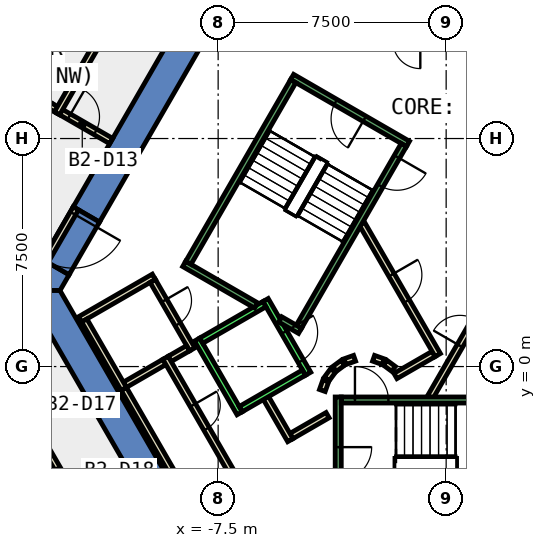
"""IFC4 building model, lengths in metres.
Left out: names, types, materials, properties, quantities, classifications, styles, units other than length and angle.
Written with IfcOpenShell. Run it as: python <this file> out.ifc"""

import sys

from ifc_helpers import new_model, si_unit, direction, frame, frame_2d, origin, place, context, subcontext, project, spatial, polyline, rectangle, outline, extrude, element, fill, save


model = new_model("IFC4")
c1 = context("Model", 3, precision=1e-05, world=origin(), true_north=direction((0.0, 1.0)))
c2 = subcontext(c1, "Body", "Model", "MODEL_VIEW")
j1 = project(units=[si_unit("LENGTHUNIT", "METRE"), si_unit("PLANEANGLEUNIT", "RADIAN")], contexts=[c1])
p1 = place(None, origin())
s1 = spatial("IfcSite", under=j1, at=p1, CompositionType="ELEMENT")
p2 = place(p1, origin())
s2 = spatial("IfcBuilding", under=s1, at=p2, CompositionType="ELEMENT")
p3 = place(p2, frame((0.0, 0.0, -11.0)))
s3 = spatial("IfcBuildingStorey", under=s2, at=p3, CompositionType="ELEMENT", Elevation=-11.0)
p4 = place(p3, frame((0.0, 0.0, -0.42)))
e1 = element("IfcWall", 1, at=p4, inside=s3, PredefinedType="SHEAR", context=c2, shape_type="SweptSolid", body=[
    extrude(outline(polyline([(-12.267, 5.252), (-11.402, 4.752), (-6.351, 13.5), (-6.928, 14.5), (-12.267, 5.252)])), origin(), (0.0, 0.0, 1.0), 5.5),
])
p5 = place(p3, frame((0.0, 0.0, -0.42)))
e2 = element("IfcWall", 2, at=p5, inside=s3, PredefinedType="SHEAR", context=c2, shape_type="SweptSolid", body=[
    extrude(outline(polyline([(-12.402, 3.02), (-13.267, 3.52), (-13.856, 2.5), (-12.702, 2.5), (-12.402, 3.02)])), origin(), (0.0, 0.0, 1.0), 5.5),
])
p6 = place(p3, frame((0.0, 0.0, 3.6)))
e3 = element("IfcWall", 3, at=p6, inside=s3, PredefinedType="SHEAR", context=c2, shape_type="SweptSolid", body=[
    extrude(outline(polyline([(-13.267, 3.52), (-12.402, 3.02), (-11.402, 4.752), (-12.267, 5.252), (-13.267, 3.52)])), origin(), (0.0, 0.0, 1.0), 1.48),
])
p7 = place(p3, frame((0.0, 0.0, -0.42)))
e4 = element("IfcWall", 4, at=p7, inside=s3, PredefinedType="SHEAR", context=c2, shape_type="SweptSolid", body=[
    extrude(outline(polyline([(-13.856, 2.5), (-6.928, -9.5), (-6.351, -8.5), (-12.702, 2.5), (-13.856, 2.5)])), origin(), (0.0, 0.0, 1.0), 5.5),
])
p8 = place(p3, frame((-12.749, 8.417, 0.0), z_axis=(0.0, 0.0, 1.0), x_axis=(0.866010750942, -0.50002537861, 0.0)))
e5 = element("IfcWall", 5, at=p8, inside=s3, PredefinedType="PARTITIONING", context=c2, shape_type="SweptSolid", body=[
    extrude(rectangle(XDim=2.0, YDim=0.2, at=frame_2d((1.0, 0.0))), origin(), (0.0, 0.0, 1.0), 5.05),
])
p9 = place(p8, frame((0.4, 0.0, 0.0)))
e6 = element("IfcOpeningElement", 6, at=p9, cuts=e5, PredefinedType="OPENING", context=c2, shape_type="SweptSolid", body=[
    extrude(rectangle(XDim=1.0, YDim=2.1, at=frame_2d((0.5, 1.05))), frame((0.0, 0.11, 0.0), z_axis=(0.0, -1.0, 0.0), x_axis=(1.0, 0.0, 0.0)), (0.0, 0.0, 1.0), 0.22),
])
p10 = place(p3, frame((-13.082, 8.609, 0.0), z_axis=(0.0, 0.0, 1.0), x_axis=(0.865998573537, -0.500046468473, 0.0)))
e7 = element("IfcWall", 7, at=p10, inside=s3, PredefinedType="PARTITIONING", context=c2, shape_type="SweptSolid", body=[
    extrude(rectangle(XDim=0.37, YDim=0.2, at=frame_2d((0.185, 0.0))), origin(), (0.0, 0.0, 1.0), 5.05),
])
p11 = place(p3, frame((-12.799, 8.33, 0.0), z_axis=(0.0, 0.0, 1.0), x_axis=(0.499923440311, 0.86606960103, 0.0)))
e8 = element("IfcWall", 8, at=p11, inside=s3, PredefinedType="PARTITIONING", context=c2, shape_type="SweptSolid", body=[
    extrude(rectangle(XDim=9.534, YDim=0.2, at=frame_2d((4.767, 0.0))), origin(), (0.0, 0.0, 1.0), 5.05),
])
p12 = place(p11, frame((5.766, 0.0, 0.0)))
e9 = element("IfcOpeningElement", 9, at=p12, cuts=e8, PredefinedType="OPENING", context=c2, shape_type="SweptSolid", body=[
    extrude(rectangle(XDim=1.0, YDim=2.1, at=frame_2d((0.5, 1.05))), frame((0.0, 0.11, 0.0), z_axis=(0.0, -1.0, 0.0), x_axis=(1.0, 0.0, 0.0)), (0.0, 0.0, 1.0), 0.22),
])
p13 = place(p3, frame((-12.124, -4.5, 0.0), z_axis=(0.0, 0.0, 1.0), x_axis=(-0.499991375441, 0.866030383119, 0.0)))
e10 = element("IfcWall", 10, at=p13, inside=s3, PredefinedType="PARTITIONING", context=c2, shape_type="SweptSolid", body=[
    extrude(rectangle(XDim=2.672, YDim=0.2, at=frame_2d((1.336, 0.0))), origin(), (0.0, 0.0, 1.0), 5.05),
])
p14 = place(p13, frame((0.743, 0.0, 0.0)))
e11 = element("IfcOpeningElement", 11, at=p14, cuts=e10, PredefinedType="OPENING", context=c2, shape_type="SweptSolid", body=[
    extrude(rectangle(XDim=1.0, YDim=2.1, at=frame_2d((0.5, 1.05))), frame((0.0, 0.11, 0.0), z_axis=(0.0, -1.0, 0.0), x_axis=(1.0, 0.0, 0.0)), (0.0, 0.0, 1.0), 0.22),
])
p15 = place(p3, frame((-9.267, 0.152, 0.0), z_axis=(0.0, 0.0, 1.0), x_axis=(-0.86599040064, -0.500060622324, 0.0)))
e12 = element("IfcWall", 12, at=p15, inside=s3, PredefinedType="PARTITIONING", context=c2, shape_type="SweptSolid", body=[
    extrude(rectangle(XDim=1.5, YDim=0.2, at=frame_2d((0.75, 0.0))), origin(), (0.0, 0.0, 1.0), 5.05),
])
p16 = place(p3, frame((-12.04, 1.553, 0.0), z_axis=(0.0, 0.0, 1.0), x_axis=(0.866056369097, 0.49994636267, 0.0)))
e13 = element("IfcWall", 13, at=p16, inside=s3, PredefinedType="PARTITIONING", context=c2, shape_type="SweptSolid", body=[
    extrude(rectangle(XDim=2.8, YDim=0.2, at=frame_2d((1.4, 0.0))), origin(), (0.0, 0.0, 1.0), 5.05),
])
p17 = place(p3, frame((-9.651, 2.817, 0.0), z_axis=(0.0, 0.0, 1.0), x_axis=(0.49989585183, -0.866085525409, 0.0)))
e14 = element("IfcWall", 14, at=p17, inside=s3, PredefinedType="PARTITIONING", context=c2, shape_type="SweptSolid", body=[
    extrude(rectangle(XDim=2.6, YDim=0.2, at=frame_2d((1.3, 0.0))), origin(), (0.0, 0.0, 1.0), 5.05),
])
p18 = place(p17, frame((0.75, 0.0, 0.0)))
e15 = element("IfcOpeningElement", 15, at=p18, cuts=e14, PredefinedType="OPENING", context=c2, shape_type="SweptSolid", body=[
    extrude(rectangle(XDim=0.9, YDim=2.1, at=frame_2d((0.45, 1.05))), frame((0.0, 0.11, 0.0), z_axis=(0.0, -1.0, 0.0), x_axis=(1.0, 0.0, 0.0)), (0.0, 0.0, 1.0), 0.22),
])
p19 = place(p3, frame((-8.488, 0.602, 0.0), z_axis=(0.0, 0.0, 1.0), x_axis=(-0.865871789474, -0.500265973451, 0.0)))
e16 = element("IfcWall", 16, at=p19, inside=s3, PredefinedType="PARTITIONING", context=c2, shape_type="SweptSolid", body=[
    extrude(rectangle(XDim=0.7, YDim=0.2, at=frame_2d((0.35, 0.0))), origin(), (0.0, 0.0, 1.0), 5.05),
])
p20 = place(p3, frame((-10.603, -0.735, 0.0), z_axis=(0.0, 0.0, 1.0), x_axis=(-0.499925626596, 0.866068339032, 0.0)))
e17 = element("IfcWall", 17, at=p20, inside=s3, PredefinedType="PARTITIONING", context=c2, shape_type="SweptSolid", body=[
    extrude(rectangle(XDim=2.601, YDim=0.2, at=frame_2d((1.3, 0.0))), origin(), (0.0, 0.0, 1.0), 5.05),
])
p21 = place(p3, frame((-9.231, 0.288, 0.0), z_axis=(0.0, 0.0, 1.0), x_axis=(0.500013631625, -0.866017533419, 0.0)))
e18 = element("IfcWall", 18, at=p21, inside=s3, PredefinedType="PARTITIONING", context=c2, shape_type="SweptSolid", body=[
    extrude(rectangle(XDim=4.5, YDim=0.2, at=frame_2d((2.25, 0.0))), origin(), (0.0, 0.0, 1.0), 5.05),
])
p22 = place(p21, frame((1.8, 0.0, 0.0)))
e19 = element("IfcOpeningElement", 19, at=p22, cuts=e18, PredefinedType="OPENING", context=c2, shape_type="SweptSolid", body=[
    extrude(rectangle(XDim=0.9, YDim=2.1, at=frame_2d((0.45, 1.05))), frame((0.0, 0.11, 0.0), z_axis=(0.0, -1.0, 0.0), x_axis=(1.0, 0.0, 0.0)), (0.0, 0.0, 1.0), 0.22),
])
p23 = place(p3, frame((-8.003, -5.238, 0.0), z_axis=(0.0, 0.0, 1.0), x_axis=(-0.500047596559, 0.865997922154, 0.0)))
e20 = element("IfcWall", 20, at=p23, inside=s3, PredefinedType="PARTITIONING", context=c2, shape_type="SweptSolid", body=[
    extrude(rectangle(XDim=5.2, YDim=0.2, at=frame_2d((2.6, 0.0))), origin(), (0.0, 0.0, 1.0), 5.05),
])
p24 = place(p3, frame((-0.52, -1.0, 0.0), z_axis=(0.0, 0.0, 1.0), x_axis=(0.50011622646, 0.865958290007, 0.0)))
e21 = element("IfcWall", 21, at=p24, inside=s3, PredefinedType="PARTITIONING", context=c2, shape_type="SweptSolid", body=[
    extrude(rectangle(XDim=4.991, YDim=0.2, at=frame_2d((2.496, 0.0))), origin(), (0.0, 0.0, 1.0), 5.05),
])
p25 = place(p24, frame((1.945, 0.0, 0.0)))
e22 = element("IfcOpeningElement", 22, at=p25, cuts=e21, PredefinedType="OPENING", context=c2, shape_type="SweptSolid", body=[
    extrude(rectangle(XDim=1.0, YDim=2.1, at=frame_2d((0.5, 1.05))), frame((0.0, 0.11, 0.0), z_axis=(0.0, -1.0, 0.0), x_axis=(1.0, 0.0, 0.0)), (0.0, 0.0, 1.0), 0.22),
])
p26 = place(p3, frame((-0.412, 0.414, 0.0), z_axis=(0.0, 0.0, 1.0), x_axis=(-0.866017369001, -0.500013916395, 0.0)))
e23 = element("IfcWall", 23, at=p26, inside=s3, PredefinedType="PARTITIONING", context=c2, shape_type="SweptSolid", body=[
    extrude(rectangle(XDim=1.45, YDim=0.2, at=frame_2d((0.725, 0.0))), origin(), (0.0, 0.0, 1.0), 5.05),
])
p27 = place(p3, frame((-1.731, -0.077, 0.0), z_axis=(0.0, 0.0, 1.0), x_axis=(-0.804311165252, 0.594208338422, 0.0)))
e24 = element("IfcWall", 24, at=p27, inside=s3, PredefinedType="PARTITIONING", context=c2, shape_type="SweptSolid", body=[
    extrude(rectangle(XDim=0.338, YDim=0.2, at=frame_2d((0.169, 0.0))), origin(), (0.0, 0.0, 1.0), 5.05),
])
p28 = place(p3, frame((-2.07, 0.16, 0.0), z_axis=(0.0, 0.0, 1.0), x_axis=(-0.942199461132, 0.335052496547, 0.0)))
e25 = element("IfcWall", 25, at=p28, inside=s3, PredefinedType="PARTITIONING", context=c2, shape_type="SweptSolid", body=[
    extrude(rectangle(XDim=0.337, YDim=0.2, at=frame_2d((0.169, 0.0))), origin(), (0.0, 0.0, 1.0), 5.05),
])
p29 = place(p3, frame((-3.012, 0.273, 0.0), z_axis=(0.0, 0.0, 1.0), x_axis=(-0.942280615813, -0.334824194261, 0.0)))
e26 = element("IfcWall", 26, at=p29, inside=s3, PredefinedType="PARTITIONING", context=c2, shape_type="SweptSolid", body=[
    extrude(rectangle(XDim=0.338, YDim=0.2, at=frame_2d((0.169, 0.0))), origin(), (0.0, 0.0, 1.0), 5.05),
])
p30 = place(p3, frame((-3.397, 0.124, 0.0), z_axis=(0.0, 0.0, 1.0), x_axis=(-0.804311165252, -0.594208338422, 0.0)))
e27 = element("IfcWall", 27, at=p30, inside=s3, PredefinedType="PARTITIONING", context=c2, shape_type="SweptSolid", body=[
    extrude(rectangle(XDim=0.338, YDim=0.2, at=frame_2d((0.169, 0.0))), origin(), (0.0, 0.0, 1.0), 5.05),
])
p31 = place(p3, frame((-3.723, -0.131, 0.0), z_axis=(0.0, 0.0, 1.0), x_axis=(-0.594675113454, -0.803966112121, 0.0)))
e28 = element("IfcWall", 28, at=p31, inside=s3, PredefinedType="PARTITIONING", context=c2, shape_type="SweptSolid", body=[
    extrude(rectangle(XDim=0.338, YDim=0.2, at=frame_2d((0.169, 0.0))), origin(), (0.0, 0.0, 1.0), 5.05),
])
p32 = place(p3, frame((-3.96, -0.47, 0.0), z_axis=(0.0, 0.0, 1.0), x_axis=(-0.334824194261, -0.942280615813, 0.0)))
e29 = element("IfcWall", 29, at=p32, inside=s3, PredefinedType="PARTITIONING", context=c2, shape_type="SweptSolid", body=[
    extrude(rectangle(XDim=0.338, YDim=0.2, at=frame_2d((0.169, 0.0))), origin(), (0.0, 0.0, 1.0), 5.05),
])
p33 = place(p3, frame((-3.9, -1.599, 0.0), z_axis=(0.0, 0.0, 1.0), x_axis=(-0.865969445389, -0.500096910261, 0.0)))
e30 = element("IfcWall", 30, at=p33, inside=s3, PredefinedType="PARTITIONING", context=c2, shape_type="SweptSolid", body=[
    extrude(rectangle(XDim=1.373, YDim=0.2, at=frame_2d((0.687, 0.0))), origin(), (0.0, 0.0, 1.0), 5.05),
])
p34 = place(p3, frame((-5.126, -2.422, 0.0), z_axis=(0.0, 0.0, 1.0), x_axis=(-0.500062241894, 0.865989465428, 0.0)))
e31 = element("IfcWall", 31, at=p34, inside=s3, PredefinedType="PARTITIONING", context=c2, shape_type="SweptSolid", body=[
    extrude(rectangle(XDim=1.7, YDim=0.2, at=frame_2d((0.85, 0.0))), origin(), (0.0, 0.0, 1.0), 5.05),
])
p35 = place(p3, frame((-2.771, 4.7, 0.0), z_axis=(0.0, 0.0, 1.0), x_axis=(0.499969479948, -0.866043023828, 0.0)))
e32 = element("IfcWall", 32, at=p35, inside=s3, PredefinedType="PARTITIONING", context=c2, shape_type="SweptSolid", body=[
    extrude(rectangle(XDim=4.99, YDim=0.2, at=frame_2d((2.495, 0.0))), origin(), (0.0, 0.0, 1.0), 5.05),
])
p36 = place(p35, frame((1.945, 0.0, 0.0)))
e33 = element("IfcOpeningElement", 33, at=p36, cuts=e32, PredefinedType="OPENING", context=c2, shape_type="SweptSolid", body=[
    extrude(rectangle(XDim=1.0, YDim=2.1, at=frame_2d((0.5, 1.05))), frame((0.0, 0.11, 0.0), z_axis=(0.0, -1.0, 0.0), x_axis=(1.0, 0.0, 0.0)), (0.0, 0.0, 1.0), 0.22),
])
p37 = place(p3, frame((-12.18, 5.202, 0.0), z_axis=(0.0, 0.0, 1.0), x_axis=(-0.50002537861, -0.866010750942, 0.0)))
e34 = element("IfcWall", 34, at=p37, inside=s3, PredefinedType="PARTITIONING", context=c2, shape_type="SweptSolid", body=[
    extrude(rectangle(XDim=2.0, YDim=0.2, at=frame_2d((1.0, 0.0))), origin(), (0.0, 0.0, 1.0), 2.4),
])
p38 = place(p37, frame((0.19, 0.0, 0.0)))
e35 = element("IfcOpeningElement", 35, at=p38, cuts=e34, PredefinedType="OPENING", context=c2, shape_type="SweptSolid", body=[
    extrude(rectangle(XDim=1.8, YDim=2.1, at=frame_2d((0.9, 1.05))), frame((0.0, 0.11, 0.0), z_axis=(0.0, -1.0, 0.0), x_axis=(1.0, 0.0, 0.0)), (0.0, 0.0, 1.0), 0.22),
])
p39 = place(p3, frame((-5.94, 2.188, 0.0), z_axis=(0.0, 0.0, 1.0), x_axis=(0.49994636267, -0.866056369097, 0.0)))
e36 = element("IfcWall", 36, at=p39, inside=s3, PredefinedType="STANDARD", context=c2, shape_type="SweptSolid", body=[
    extrude(rectangle(XDim=2.8, YDim=0.2, at=frame_2d((1.4, 0.0))), origin(), (0.0, 0.0, 1.0), 5.05),
])
p40 = place(p39, frame((1.225, 0.0, 0.0)))
e37 = element("IfcOpeningElement", 37, at=p40, cuts=e36, PredefinedType="OPENING", context=c2, shape_type="SweptSolid", body=[
    extrude(rectangle(XDim=1.1, YDim=2.1, at=frame_2d((0.55, 1.05))), frame((0.0, 0.11, 0.0), z_axis=(0.0, -1.0, 0.0), x_axis=(1.0, 0.0, 0.0)), (0.0, 0.0, 1.0), 0.22),
])
p41 = place(p3, frame((-8.192, 0.888, 0.0), z_axis=(0.0, 0.0, 1.0), x_axis=(0.49994636267, -0.866056369097, 0.0)))
e38 = element("IfcWall", 38, at=p41, inside=s3, PredefinedType="STANDARD", context=c2, shape_type="SweptSolid", body=[
    extrude(rectangle(XDim=2.8, YDim=0.2, at=frame_2d((1.4, 0.0))), origin(), (0.0, 0.0, 1.0), 5.05),
])
for number, where, z_axis, x_axis in (
    (39, (-5.977, 2.052, 0.0), (0.0, 0.0, 1.0), (-0.866, -0.5, 0.0)),
    (40, (-4.677, -0.2, 0.0), (0.0, 0.0, 1.0), (-0.866, -0.5, 0.0)),
):
    element("IfcWall", number, at=place(p3, frame(where, z_axis=z_axis, x_axis=x_axis)), inside=s3, PredefinedType="STANDARD", context=c2, shape_type="SweptSolid", body=[
        extrude(rectangle(XDim=2.399, YDim=0.2, at=frame_2d((1.2, 0.0))), origin(), (0.0, 0.0, 1.0), 5.05),
    ])
p42 = place(p3, frame((-3.55, -1.0, 0.0), z_axis=(0.0, 0.0, 1.0), x_axis=(0.0, -1.0, 0.0)))
e41 = element("IfcWall", 41, at=p42, inside=s3, PredefinedType="STANDARD", context=c2, shape_type="SweptSolid", body=[
    extrude(rectangle(XDim=4.4, YDim=0.2, at=frame_2d((2.2, 0.0))), origin(), (0.0, 0.0, 1.0), 5.05),
])
p43 = place(p42, frame((1.65, 0.0, 0.0)))
e42 = element("IfcOpeningElement", 42, at=p43, cuts=e41, PredefinedType="OPENING", context=c2, shape_type="SweptSolid", body=[
    extrude(rectangle(XDim=1.1, YDim=2.2, at=frame_2d((0.55, 1.1))), frame((0.0, 0.11, 0.0), z_axis=(0.0, -1.0, 0.0), x_axis=(1.0, 0.0, 0.0)), (0.0, 0.0, 1.0), 0.22),
])
p44 = place(p3, frame((-3.45, -1.1, 0.0), z_axis=(0.0, 0.0, 1.0), x_axis=(1.0, 0.0, 0.0)))
e43 = element("IfcWall", 43, at=p44, inside=s3, PredefinedType="STANDARD", context=c2, shape_type="SweptSolid", body=[
    extrude(rectangle(XDim=6.9, YDim=0.2, at=frame_2d((3.45, 0.0))), origin(), (0.0, 0.0, 1.0), 5.05),
])
p45 = place(p44, frame((0.45, 0.0, 0.0)))
e44 = element("IfcOpeningElement", 44, at=p45, cuts=e43, PredefinedType="OPENING", context=c2, shape_type="SweptSolid", body=[
    extrude(rectangle(XDim=1.1, YDim=2.2, at=frame_2d((0.55, 1.1))), frame((0.0, 0.11, 0.0), z_axis=(0.0, -1.0, 0.0), x_axis=(1.0, 0.0, 0.0)), (0.0, 0.0, 1.0), 0.22),
])
p46 = place(p3, frame((-1.256, 7.324, 0.0), z_axis=(0.0, 0.0, 1.0), x_axis=(-0.866046073146, 0.499964197906, 0.0)))
e45 = element("IfcWall", 45, at=p46, inside=s3, PredefinedType="STANDARD", context=c2, shape_type="SweptSolid", body=[
    extrude(rectangle(XDim=4.4, YDim=0.2, at=frame_2d((2.2, 0.0))), origin(), (0.0, 0.0, 1.0), 5.05),
])
p47 = place(p46, frame((1.65, 0.0, 0.0)))
e46 = element("IfcOpeningElement", 46, at=p47, cuts=e45, PredefinedType="OPENING", context=c2, shape_type="SweptSolid", body=[
    extrude(rectangle(XDim=1.1, YDim=2.2, at=frame_2d((0.55, 1.1))), frame((0.0, 0.11, 0.0), z_axis=(0.0, -1.0, 0.0), x_axis=(1.0, 0.0, 0.0)), (0.0, 0.0, 1.0), 0.22),
])
p48 = place(p3, frame((-6.25, 2.01, 0.0), z_axis=(0.0, 0.0, 1.0), x_axis=(-0.86611865017, 0.499838457731, 0.0)))
e47 = element("IfcWall", 47, at=p48, inside=s3, PredefinedType="STANDARD", context=c2, shape_type="SweptSolid", body=[
    extrude(rectangle(XDim=2.733, YDim=0.2, at=frame_2d((1.366, 0.0))), origin(), (0.0, 0.0, 1.0), 5.05),
])
p49 = place(p3, frame((-4.806, 1.176, 0.0), z_axis=(0.0, 0.0, 1.0), x_axis=(-0.866558586415, 0.499075361355, 0.0)))
e48 = element("IfcWall", 48, at=p49, inside=s3, PredefinedType="STANDARD", context=c2, shape_type="SweptSolid", body=[
    extrude(rectangle(XDim=0.751, YDim=0.2, at=frame_2d((0.376, 0.0))), origin(), (0.0, 0.0, 1.0), 5.05),
])
p50 = place(p3, frame((-1.393, 7.288, 0.0), z_axis=(0.0, 0.0, 1.0), x_axis=(-0.499963383562, -0.866046543262, 0.0)))
e49 = element("IfcWall", 49, at=p50, inside=s3, PredefinedType="STANDARD", context=c2, shape_type="SweptSolid", body=[
    extrude(rectangle(XDim=6.9, YDim=0.2, at=frame_2d((3.45, 0.0))), origin(), (0.0, 0.0, 1.0), 5.05),
])
p51 = place(p50, frame((0.45, 0.0, 0.0)))
e50 = element("IfcOpeningElement", 50, at=p51, cuts=e49, PredefinedType="OPENING", context=c2, shape_type="SweptSolid", body=[
    extrude(rectangle(XDim=1.1, YDim=2.2, at=frame_2d((0.55, 1.1))), frame((0.0, 0.11, 0.0), z_axis=(0.0, -1.0, 0.0), x_axis=(1.0, 0.0, 0.0)), (0.0, 0.0, 1.0), 0.22),
])
p52 = place(p3, frame((-5.03, 9.388, 0.0), z_axis=(0.0, 0.0, 1.0), x_axis=(-0.499978703459, -0.866037698999, 0.0)))
e51 = element("IfcWall", 51, at=p52, inside=s3, PredefinedType="STANDARD", context=c2, shape_type="SweptSolid", body=[
    extrude(rectangle(XDim=6.9, YDim=0.2, at=frame_2d((3.45, 0.0))), origin(), (0.0, 0.0, 1.0), 5.05),
])
p53 = place(p9, origin())
e52 = element("IfcDoor", 52, at=p53, inside=s3, OperationType="SINGLE_SWING_LEFT", PredefinedType="DOOR", context=c2, shape_type="SweptSolid", body=[
    extrude(rectangle(XDim=1.0, YDim=2.1, at=frame_2d((0.5, 1.05))), frame((0.0, 0.025, 0.0), z_axis=(0.0, -1.0, 0.0), x_axis=(1.0, 0.0, 0.0)), (0.0, 0.0, 1.0), 0.05),
])
fill(e6, e52)
p54 = place(p14, origin())
e53 = element("IfcDoor", 53, at=p54, inside=s3, OperationType="SINGLE_SWING_RIGHT", PredefinedType="DOOR", context=c2, shape_type="SweptSolid", body=[
    extrude(rectangle(XDim=1.0, YDim=2.1, at=frame_2d((0.5, 1.05))), frame((0.0, 0.025, 0.0), z_axis=(0.0, -1.0, 0.0), x_axis=(1.0, 0.0, 0.0)), (0.0, 0.0, 1.0), 0.05),
])
fill(e11, e53)
p55 = place(p25, origin())
e54 = element("IfcDoor", 54, at=p55, inside=s3, OperationType="SINGLE_SWING_LEFT", PredefinedType="DOOR", context=c2, shape_type="SweptSolid", body=[
    extrude(rectangle(XDim=1.0, YDim=2.1, at=frame_2d((0.5, 1.05))), frame((0.0, 0.025, 0.0), z_axis=(0.0, -1.0, 0.0), x_axis=(1.0, 0.0, 0.0)), (0.0, 0.0, 1.0), 0.05),
])
fill(e22, e54)
p56 = place(p36, origin())
e55 = element("IfcDoor", 55, at=p56, inside=s3, OperationType="SINGLE_SWING_RIGHT", PredefinedType="DOOR", context=c2, shape_type="SweptSolid", body=[
    extrude(rectangle(XDim=1.0, YDim=2.1, at=frame_2d((0.5, 1.05))), frame((0.0, 0.025, 0.0), z_axis=(0.0, -1.0, 0.0), x_axis=(1.0, 0.0, 0.0)), (0.0, 0.0, 1.0), 0.05),
])
fill(e33, e55)
p57 = place(p18, origin())
e56 = element("IfcDoor", 56, at=p57, inside=s3, OperationType="SINGLE_SWING_RIGHT", PredefinedType="DOOR", context=c2, shape_type="SweptSolid", body=[
    extrude(rectangle(XDim=0.9, YDim=2.1, at=frame_2d((0.45, 1.05))), frame((0.0, 0.025, 0.0), z_axis=(0.0, -1.0, 0.0), x_axis=(1.0, 0.0, 0.0)), (0.0, 0.0, 1.0), 0.05),
])
fill(e15, e56)
p58 = place(p22, origin())
e57 = element("IfcDoor", 57, at=p58, inside=s3, OperationType="SINGLE_SWING_LEFT", PredefinedType="DOOR", context=c2, shape_type="SweptSolid", body=[
    extrude(rectangle(XDim=0.9, YDim=2.1, at=frame_2d((0.45, 1.05))), frame((0.0, 0.025, 0.0), z_axis=(0.0, -1.0, 0.0), x_axis=(1.0, 0.0, 0.0)), (0.0, 0.0, 1.0), 0.05),
])
fill(e19, e57)
p59 = place(p38, origin())
e58 = element("IfcDoor", 58, at=p59, inside=s3, OperationType="DOUBLE_DOOR_SINGLE_SWING", PredefinedType="DOOR", context=c2, shape_type="SweptSolid", body=[
    extrude(rectangle(XDim=1.8, YDim=2.1, at=frame_2d((0.9, 1.05))), frame((0.0, 0.025, 0.0), z_axis=(0.0, -1.0, 0.0), x_axis=(1.0, 0.0, 0.0)), (0.0, 0.0, 1.0), 0.05),
])
fill(e35, e58)
p60 = place(p40, origin())
e59 = element("IfcDoor", 59, at=p60, inside=s3, OperationType="SLIDING_TO_LEFT", PredefinedType="DOOR", context=c2, shape_type="SweptSolid", body=[
    extrude(rectangle(XDim=1.1, YDim=2.1, at=frame_2d((0.55, 1.05))), frame((0.0, 0.025, 0.0), z_axis=(0.0, -1.0, 0.0), x_axis=(1.0, 0.0, 0.0)), (0.0, 0.0, 1.0), 0.05),
])
fill(e37, e59)
p61 = place(p45, origin())
e60 = element("IfcDoor", 60, at=p61, inside=s3, OperationType="SINGLE_SWING_LEFT", PredefinedType="DOOR", context=c2, shape_type="SweptSolid", body=[
    extrude(rectangle(XDim=1.1, YDim=2.2, at=frame_2d((0.55, 1.1))), frame((0.0, 0.025, 0.0), z_axis=(0.0, -1.0, 0.0), x_axis=(1.0, 0.0, 0.0)), (0.0, 0.0, 1.0), 0.05),
])
fill(e44, e60)
p62 = place(p43, origin())
e61 = element("IfcDoor", 61, at=p62, inside=s3, OperationType="SINGLE_SWING_LEFT", PredefinedType="DOOR", context=c2, shape_type="SweptSolid", body=[
    extrude(rectangle(XDim=1.1, YDim=2.2, at=frame_2d((0.55, 1.1))), frame((0.0, 0.025, 0.0), z_axis=(0.0, -1.0, 0.0), x_axis=(1.0, 0.0, 0.0)), (0.0, 0.0, 1.0), 0.05),
])
fill(e42, e61)
p63 = place(p51, origin())
e62 = element("IfcDoor", 62, at=p63, inside=s3, OperationType="SINGLE_SWING_LEFT", PredefinedType="DOOR", context=c2, shape_type="SweptSolid", body=[
    extrude(rectangle(XDim=1.1, YDim=2.2, at=frame_2d((0.55, 1.1))), frame((0.0, 0.025, 0.0), z_axis=(0.0, -1.0, 0.0), x_axis=(1.0, 0.0, 0.0)), (0.0, 0.0, 1.0), 0.05),
])
fill(e50, e62)
p64 = place(p47, origin())
e63 = element("IfcDoor", 63, at=p64, inside=s3, OperationType="SINGLE_SWING_LEFT", PredefinedType="DOOR", context=c2, shape_type="SweptSolid", body=[
    extrude(rectangle(XDim=1.1, YDim=2.2, at=frame_2d((0.55, 1.1))), frame((0.0, 0.025, 0.0), z_axis=(0.0, -1.0, 0.0), x_axis=(1.0, 0.0, 0.0)), (0.0, 0.0, 1.0), 0.05),
])
fill(e46, e63)
save(model, sys.argv[1])
